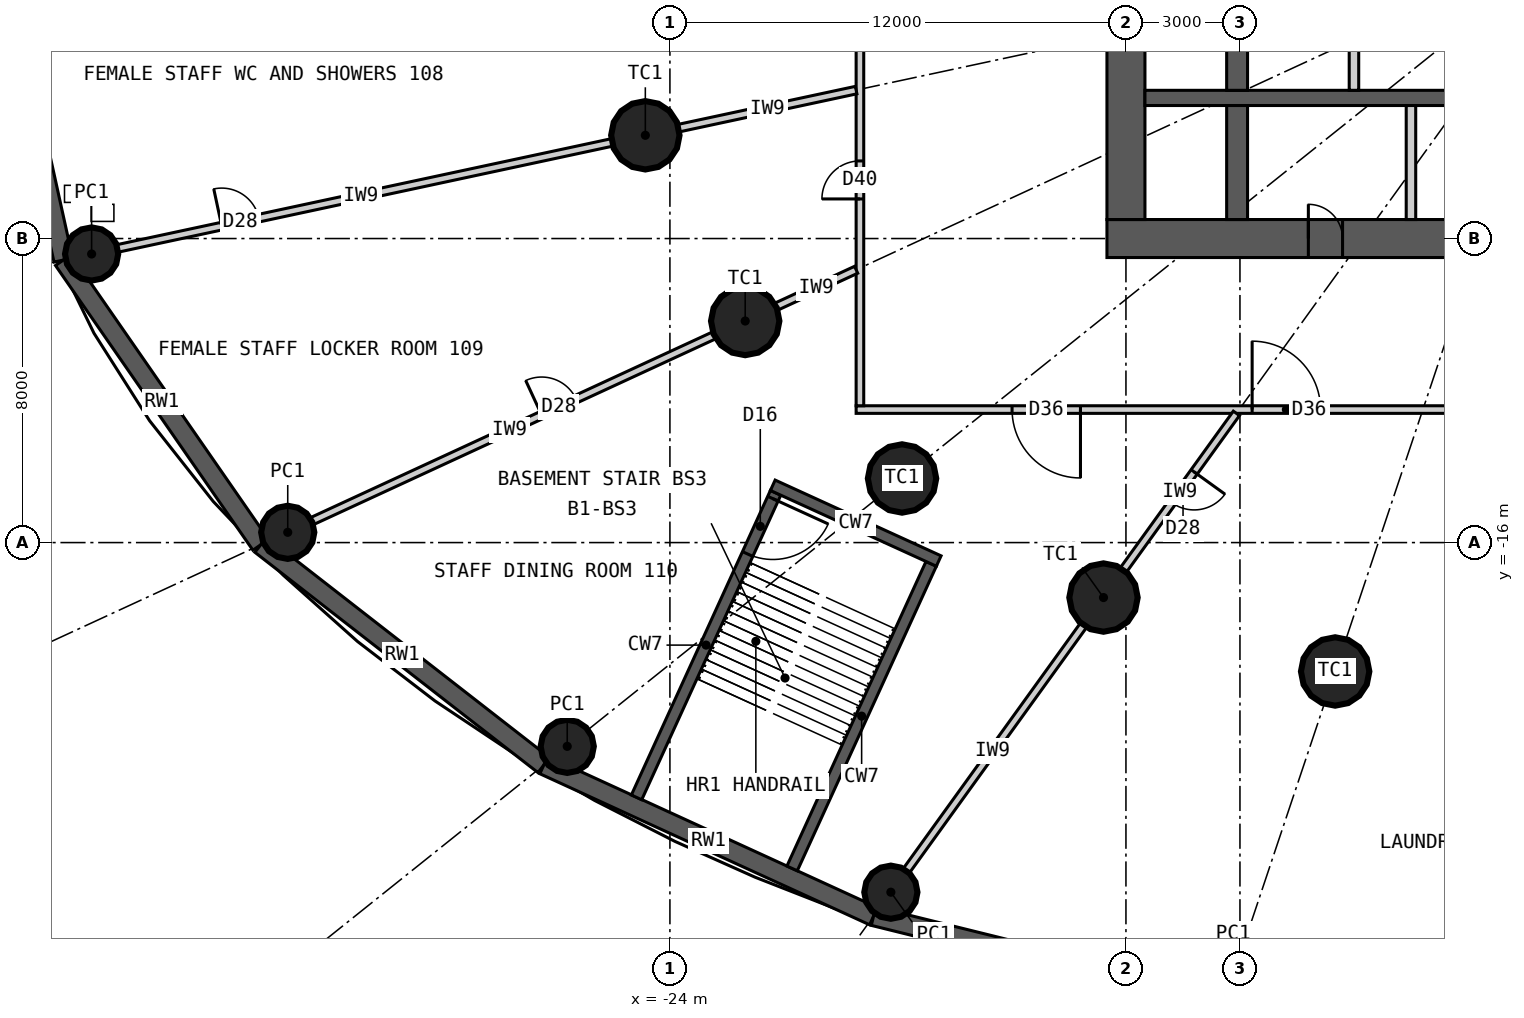
"""IFC4 building model, lengths in metres.
Left out: names, types, materials, properties, quantities, classifications, styles, units other than length and angle.
Written with IfcOpenShell. Run it as: python <this file> out.ifc"""

import sys

from ifc_helpers import new_model, si_unit, direction, frame, frame_2d, origin, origin_2d, place, context, subcontext, project, spatial, rectangle, circle, extrude, element, fill, save


model = new_model("IFC4")
c1 = context("Model", 3, precision=1e-05, world=origin(), true_north=direction((0.0, 1.0)))
c2 = subcontext(c1, "Body", "Model", "MODEL_VIEW")
j1 = project(units=[si_unit("LENGTHUNIT", "METRE"), si_unit("PLANEANGLEUNIT", "RADIAN")], contexts=[c1])
p1 = place(None, origin())
s1 = spatial("IfcSite", under=j1, at=p1, CompositionType="ELEMENT")
p2 = place(p1, origin())
s2 = spatial("IfcBuilding", under=s1, at=p2, CompositionType="ELEMENT")
p3 = place(p2, frame((0.0, 0.0, -6.0)))
s3 = spatial("IfcBuildingStorey", under=s2, at=p3, CompositionType="ELEMENT", Elevation=-6.0)
for number, where, z_axis, x_axis in (
    (1, (-24.647, -5.283, 0.0), (0.0, 0.0, 1.0), (1.0, 0.0, 0.0)),
    (2, (-22.019, -10.17, 0.0), (0.0, 0.0, 1.0), (1.0, 0.0, 0.0)),
    (3, (-17.892, -14.313, 0.0), (0.0, 0.0, 1.0), (1.0, 0.0, 0.0)),
    (4, (-12.591, -17.447, 0.0), (0.0, 0.0, 1.0), (1.0, 0.0, 0.0)),
    (5, (-6.495, -19.391, 0.0), (0.0, 0.0, 1.0), (1.0, 0.0, 0.0)),
):
    element("IfcColumn", number, at=place(p3, frame(where, z_axis=z_axis, x_axis=x_axis)), inside=s3, PredefinedType="COLUMN", context=c2, shape_type="SweptSolid", body=[
        extrude(circle(Radius=0.9, at=origin_2d()), origin(), (0.0, 0.0, 1.0), 6.0),
    ])
for number, where, z_axis, x_axis in (
    (6, (-39.218, -8.407, 0.0), (0.0, 0.0, 1.0), (1.0, 0.0, 0.0)),
    (7, (-34.057, -15.73, 0.0), (0.0, 0.0, 1.0), (1.0, 0.0, 0.0)),
    (8, (-26.702, -21.362, 0.0), (0.0, 0.0, 1.0), (1.0, 0.0, 0.0)),
    (9, (-18.186, -25.199, 0.0), (0.0, 0.0, 1.0), (1.0, 0.0, 0.0)),
):
    element("IfcColumn", number, at=place(p3, frame(where, z_axis=z_axis, x_axis=x_axis)), inside=s3, PredefinedType="COLUMN", context=c2, shape_type="SweptSolid", body=[
        extrude(circle(Radius=0.7, at=origin_2d()), origin(), (0.0, 0.0, 1.0), 6.0),
    ])
p4 = place(p3, frame((12.5, -8.0, 0.0), z_axis=(0.0, 0.0, 1.0), x_axis=(-1.0, 0.0, 0.0)))
e10 = element("IfcWall", 10, at=p4, inside=s3, PredefinedType="SHEAR", context=c2, shape_type="SweptSolid", body=[
    extrude(rectangle(XDim=25.0, YDim=1.0, at=frame_2d((12.5, 0.0))), origin(), (0.0, 0.0, 1.0), 6.0),
])
p5 = place(p4, frame((11.2, 0.0, 0.0)))
e11 = element("IfcOpeningElement", 11, at=p5, cuts=e10, PredefinedType="OPENING", context=c2, shape_type="SweptSolid", body=[
    extrude(rectangle(XDim=1.2, YDim=2.2, at=frame_2d((0.6, 1.1))), frame((0.0, 0.51, 0.0), z_axis=(0.0, -1.0, 0.0), x_axis=(1.0, 0.0, 0.0)), (0.0, 0.0, 1.0), 1.02),
])
p6 = place(p4, frame((18.8, 0.0, 0.0)))
e12 = element("IfcOpeningElement", 12, at=p6, cuts=e10, PredefinedType="OPENING", context=c2, shape_type="SweptSolid", body=[
    extrude(rectangle(XDim=0.9, YDim=2.2, at=frame_2d((0.45, 1.1))), frame((0.0, 0.51, 0.0), z_axis=(0.0, -1.0, 0.0), x_axis=(1.0, 0.0, 0.0)), (0.0, 0.0, 1.0), 1.02),
])
p7 = place(p3, frame((-12.0, 7.5, 0.0), z_axis=(0.0, 0.0, 1.0), x_axis=(0.0, -1.0, 0.0)))
e13 = element("IfcWall", 13, at=p7, inside=s3, PredefinedType="SHEAR", context=c2, shape_type="SweptSolid", body=[
    extrude(rectangle(XDim=15.0, YDim=1.0, at=frame_2d((7.5, 0.0))), origin(), (0.0, 0.0, 1.0), 6.0),
])
p8 = place(p7, frame((6.6, 0.0, 0.0)))
e14 = element("IfcOpeningElement", 14, at=p8, cuts=e13, PredefinedType="OPENING", context=c2, shape_type="SweptSolid", body=[
    extrude(rectangle(XDim=1.8, YDim=2.2, at=frame_2d((0.9, 1.1))), frame((0.0, 0.51, 0.0), z_axis=(0.0, -1.0, 0.0), x_axis=(1.0, 0.0, 0.0)), (0.0, 0.0, 1.0), 1.02),
])
p9 = place(p3, frame((-11.5, -4.3, 0.0), z_axis=(0.0, 0.0, 1.0), x_axis=(1.0, 0.0, 0.0)))
e15 = element("IfcWall", 15, at=p9, inside=s3, PredefinedType="SHEAR", context=c2, shape_type="SweptSolid", body=[
    extrude(rectangle(XDim=23.0, YDim=0.4, at=frame_2d((11.5, 0.0))), origin(), (0.0, 0.0, 1.0), 6.0),
])
p10 = place(p3, frame((-9.075, -4.1, 0.0), z_axis=(0.0, 0.0, 1.0), x_axis=(0.0, 1.0, 0.0)))
e16 = element("IfcWall", 16, at=p10, inside=s3, PredefinedType="SHEAR", context=c2, shape_type="SweptSolid", body=[
    extrude(rectangle(XDim=2.35, YDim=0.55, at=frame_2d((1.175, 0.0))), origin(), (0.0, 0.0, 1.0), 6.0),
])
p11 = place(p3, frame((-9.075, -7.5, 0.0), z_axis=(0.0, 0.0, 1.0), x_axis=(0.0, 1.0, 0.0)))
e17 = element("IfcWall", 17, at=p11, inside=s3, PredefinedType="SHEAR", context=c2, shape_type="SweptSolid", body=[
    extrude(rectangle(XDim=3.0, YDim=0.55, at=frame_2d((1.5, 0.0))), origin(), (0.0, 0.0, 1.0), 6.0),
])
p12 = place(p3, frame((-4.5, -7.5, 0.0), z_axis=(0.0, 0.0, 1.0), x_axis=(0.0, 1.0, 0.0)))
e18 = element("IfcWall", 18, at=p12, inside=s3, PredefinedType="PARTITIONING", context=c2, shape_type="SweptSolid", body=[
    extrude(rectangle(XDim=3.0, YDim=0.25, at=frame_2d((1.5, 0.0))), origin(), (0.0, 0.0, 1.0), 6.0),
])
p13 = place(p3, frame((-6.0, -4.1, 0.0), z_axis=(0.0, 0.0, 1.0), x_axis=(0.0, 1.0, 0.0)))
e19 = element("IfcWall", 19, at=p13, inside=s3, PredefinedType="PARTITIONING", context=c2, shape_type="SweptSolid", body=[
    extrude(rectangle(XDim=2.35, YDim=0.25, at=frame_2d((1.175, 0.0))), origin(), (0.0, 0.0, 1.0), 6.0),
])
p14 = place(p3, frame((-41.85, 0.0, 0.0), z_axis=(0.0, 0.0, 1.0), x_axis=(0.215170782675, -0.976576435454, 0.0)))
e20 = element("IfcWall", 20, at=p14, inside=s3, PredefinedType="SOLIDWALL", context=c2, shape_type="SweptSolid", body=[
    extrude(rectangle(XDim=8.772, YDim=0.5, at=frame_2d((4.386, 0.0))), origin(), (0.0, 0.0, 1.0), 5.75),
])
p15 = place(p3, frame((-39.963, -8.566, 0.0), z_axis=(0.0, 0.0, 1.0), x_axis=(0.569815549616, -0.821772620264, 0.0)))
e21 = element("IfcWall", 21, at=p15, inside=s3, PredefinedType="SOLIDWALL", context=c2, shape_type="SweptSolid", body=[
    extrude(rectangle(XDim=9.117, YDim=0.5, at=frame_2d((4.559, 0.0))), origin(), (0.0, 0.0, 1.0), 5.75),
])
p16 = place(p3, frame((-34.768, -16.059, 0.0), z_axis=(0.0, 0.0, 1.0), x_axis=(0.789189230142, -0.614150111152, 0.0)))
e22 = element("IfcWall", 22, at=p16, inside=s3, PredefinedType="SOLIDWALL", context=c2, shape_type="SweptSolid", body=[
    extrude(rectangle(XDim=9.438, YDim=0.5, at=frame_2d((4.719, 0.0))), origin(), (0.0, 0.0, 1.0), 5.75),
])
p17 = place(p3, frame((-27.319, -21.855, 0.0), z_axis=(0.0, 0.0, 1.0), x_axis=(0.909171365198, -0.416422176047, 0.0)))
e23 = element("IfcWall", 23, at=p17, inside=s3, PredefinedType="SOLIDWALL", context=c2, shape_type="SweptSolid", body=[
    extrude(rectangle(XDim=9.545, YDim=0.5, at=frame_2d((4.772, 0.0))), origin(), (0.0, 0.0, 1.0), 5.75),
])
p18 = place(p3, frame((-18.641, -25.83, 0.0), z_axis=(0.0, 0.0, 1.0), x_axis=(0.97078133687, -0.239965822533, 0.0)))
e24 = element("IfcWall", 24, at=p18, inside=s3, PredefinedType="SOLIDWALL", context=c2, shape_type="SweptSolid", body=[
    extrude(rectangle(XDim=9.503, YDim=0.5, at=frame_2d((4.752, 0.0))), origin(), (0.0, 0.0, 1.0), 5.75),
])
p19 = place(p3, frame((19.1, -12.5, 0.0), z_axis=(0.0, 0.0, 1.0), x_axis=(-1.0, 0.0, 0.0)))
e25 = element("IfcWall", 25, at=p19, inside=s3, PredefinedType="PARTITIONING", context=c2, shape_type="SweptSolid", body=[
    extrude(rectangle(XDim=38.2, YDim=0.2, at=frame_2d((19.1, 0.0))), origin(), (0.0, 0.0, 1.0), 5.75),
])
p20 = place(p19, frame((32.297, 0.0, 0.0)))
e26 = element("IfcOpeningElement", 26, at=p20, cuts=e25, PredefinedType="OPENING", context=c2, shape_type="SweptSolid", body=[
    extrude(rectangle(XDim=1.8, YDim=2.4, at=frame_2d((0.9, 1.2))), frame((0.0, 0.11, 0.0), z_axis=(0.0, -1.0, 0.0), x_axis=(1.0, 0.0, 0.0)), (0.0, 0.0, 1.0), 0.22),
])
p21 = place(p19, frame((19.079, 0.0, 0.0)))
e27 = element("IfcOpeningElement", 27, at=p21, cuts=e25, PredefinedType="OPENING", context=c2, shape_type="SweptSolid", body=[
    extrude(rectangle(XDim=1.8, YDim=2.4, at=frame_2d((0.9, 1.2))), frame((0.0, 0.11, 0.0), z_axis=(0.0, -1.0, 0.0), x_axis=(1.0, 0.0, 0.0)), (0.0, 0.0, 1.0), 0.22),
])
p22 = place(p19, frame((11.843, 0.0, 0.0)))
e28 = element("IfcOpeningElement", 28, at=p22, cuts=e25, PredefinedType="OPENING", context=c2, shape_type="SweptSolid", body=[
    extrude(rectangle(XDim=1.2, YDim=2.2, at=frame_2d((0.6, 1.1))), frame((0.0, 0.11, 0.0), z_axis=(0.0, -1.0, 0.0), x_axis=(1.0, 0.0, 0.0)), (0.0, 0.0, 1.0), 0.22),
])
p23 = place(p19, frame((6.178, 0.0, 0.0)))
e29 = element("IfcOpeningElement", 29, at=p23, cuts=e25, PredefinedType="OPENING", context=c2, shape_type="SweptSolid", body=[
    extrude(rectangle(XDim=1.0, YDim=2.2, at=frame_2d((0.5, 1.1))), frame((0.0, 0.11, 0.0), z_axis=(0.0, -1.0, 0.0), x_axis=(1.0, 0.0, 0.0)), (0.0, 0.0, 1.0), 0.22),
])
p24 = place(p19, frame((25.979, 0.0, 0.0)))
e30 = element("IfcOpeningElement", 30, at=p24, cuts=e25, PredefinedType="OPENING", context=c2, shape_type="SweptSolid", body=[
    extrude(rectangle(XDim=1.8, YDim=2.4, at=frame_2d((0.9, 1.2))), frame((0.0, 0.11, 0.0), z_axis=(0.0, -1.0, 0.0), x_axis=(1.0, 0.0, 0.0)), (0.0, 0.0, 1.0), 0.22),
])
p25 = place(p3, frame((-19.0, 12.4, 0.0), z_axis=(0.0, 0.0, 1.0), x_axis=(0.0, -1.0, 0.0)))
e31 = element("IfcWall", 31, at=p25, inside=s3, PredefinedType="PARTITIONING", context=c2, shape_type="SweptSolid", body=[
    extrude(rectangle(XDim=24.8, YDim=0.2, at=frame_2d((12.4, 0.0))), origin(), (0.0, 0.0, 1.0), 5.75),
])
p26 = place(p25, frame((5.442, 0.0, 0.0)))
e32 = element("IfcOpeningElement", 32, at=p26, cuts=e31, PredefinedType="OPENING", context=c2, shape_type="SweptSolid", body=[
    extrude(rectangle(XDim=1.0, YDim=2.2, at=frame_2d((0.5, 1.1))), frame((0.0, 0.11, 0.0), z_axis=(0.0, -1.0, 0.0), x_axis=(1.0, 0.0, 0.0)), (0.0, 0.0, 1.0), 0.22),
])
p27 = place(p25, frame((9.853, 0.0, 0.0)))
e33 = element("IfcOpeningElement", 33, at=p27, cuts=e31, PredefinedType="OPENING", context=c2, shape_type="SweptSolid", body=[
    extrude(rectangle(XDim=1.0, YDim=2.1, at=frame_2d((0.5, 1.05))), frame((0.0, 0.11, 0.0), z_axis=(0.0, -1.0, 0.0), x_axis=(1.0, 0.0, 0.0)), (0.0, 0.0, 1.0), 0.22),
])
p28 = place(p25, frame((13.947, 0.0, 0.0)))
e34 = element("IfcOpeningElement", 34, at=p28, cuts=e31, PredefinedType="OPENING", context=c2, shape_type="SweptSolid", body=[
    extrude(rectangle(XDim=1.0, YDim=2.1, at=frame_2d((0.5, 1.05))), frame((0.0, 0.11, 0.0), z_axis=(0.0, -1.0, 0.0), x_axis=(1.0, 0.0, 0.0)), (0.0, 0.0, 1.0), 0.22),
])
p29 = place(p25, frame((18.358, 0.0, 0.0)))
e35 = element("IfcOpeningElement", 35, at=p29, cuts=e31, PredefinedType="OPENING", context=c2, shape_type="SweptSolid", body=[
    extrude(rectangle(XDim=1.0, YDim=2.2, at=frame_2d((0.5, 1.1))), frame((0.0, 0.11, 0.0), z_axis=(0.0, -1.0, 0.0), x_axis=(1.0, 0.0, 0.0)), (0.0, 0.0, 1.0), 0.22),
])
p30 = place(p3, frame((-19.1, -4.094, 0.0), z_axis=(0.0, 0.0, 1.0), x_axis=(-0.977784445586, -0.209612924148, 0.0)))
e36 = element("IfcWall", 36, at=p30, inside=s3, PredefinedType="PARTITIONING", context=c2, shape_type="SweptSolid", body=[
    extrude(rectangle(XDim=4.773, YDim=0.2, at=frame_2d((2.386, 0.0))), origin(), (0.0, 0.0, 1.0), 4.9),
])
p31 = place(p3, frame((-25.527, -5.472, 0.0), z_axis=(0.0, 0.0, 1.0), x_axis=(-0.97778865169, -0.209593302913, 0.0)))
e37 = element("IfcWall", 37, at=p31, inside=s3, PredefinedType="PARTITIONING", context=c2, shape_type="SweptSolid", body=[
    extrude(rectangle(XDim=13.501, YDim=0.2, at=frame_2d((6.751, 0.0))), origin(), (0.0, 0.0, 1.0), 4.85),
])
p32 = place(p31, frame((9.5, 0.0, 0.0)))
e38 = element("IfcOpeningElement", 38, at=p32, cuts=e37, PredefinedType="OPENING", context=c2, shape_type="SweptSolid", body=[
    extrude(rectangle(XDim=1.0, YDim=2.2, at=frame_2d((0.5, 1.1))), frame((0.0, 0.11, 0.0), z_axis=(0.0, -1.0, 0.0), x_axis=(1.0, 0.0, 0.0)), (0.0, 0.0, 1.0), 0.22),
])
p33 = place(p3, frame((-19.1, -8.822, 0.0), z_axis=(0.0, 0.0, 1.0), x_axis=(-0.907872952542, -0.419245395971, 0.0)))
e39 = element("IfcWall", 39, at=p33, inside=s3, PredefinedType="PARTITIONING", context=c2, shape_type="SweptSolid", body=[
    extrude(rectangle(XDim=2.315, YDim=0.2, at=frame_2d((1.158, 0.0))), origin(), (0.0, 0.0, 1.0), 4.85),
])
p34 = place(p3, frame((-22.836, -10.548, 0.0), z_axis=(0.0, 0.0, 1.0), x_axis=(-0.90784065247, -0.419315334471, 0.0)))
e40 = element("IfcWall", 40, at=p34, inside=s3, PredefinedType="PARTITIONING", context=c2, shape_type="SweptSolid", body=[
    extrude(rectangle(XDim=11.86, YDim=0.2, at=frame_2d((5.93, 0.0))), origin(), (0.0, 0.0, 1.0), 4.85),
])
p35 = place(p34, frame((4.0, 0.0, 0.0)))
e41 = element("IfcOpeningElement", 41, at=p35, cuts=e40, PredefinedType="OPENING", context=c2, shape_type="SweptSolid", body=[
    extrude(rectangle(XDim=1.0, YDim=2.2, at=frame_2d((0.5, 1.1))), frame((0.0, 0.11, 0.0), z_axis=(0.0, -1.0, 0.0), x_axis=(1.0, 0.0, 0.0)), (0.0, 0.0, 1.0), 0.22),
])
p36 = place(p3, frame((-9.093, -12.6, 0.0), z_axis=(0.0, 0.0, 1.0), x_axis=(-0.58522538525, -0.810870673079, 0.0)))
e42 = element("IfcWall", 42, at=p36, inside=s3, PredefinedType="PARTITIONING", context=c2, shape_type="SweptSolid", body=[
    extrude(rectangle(XDim=5.077, YDim=0.2, at=frame_2d((2.538, 0.0))), origin(), (0.0, 0.0, 1.0), 4.9),
])
p37 = place(p36, frame((1.9, 0.0, 0.0)))
e43 = element("IfcOpeningElement", 43, at=p37, cuts=e42, PredefinedType="OPENING", context=c2, shape_type="SweptSolid", body=[
    extrude(rectangle(XDim=1.0, YDim=2.2, at=frame_2d((0.5, 1.1))), frame((0.0, 0.11, 0.0), z_axis=(0.0, -1.0, 0.0), x_axis=(1.0, 0.0, 0.0)), (0.0, 0.0, 1.0), 0.22),
])
p38 = place(p3, frame((-13.118, -18.176, 0.0), z_axis=(0.0, 0.0, 1.0), x_axis=(-0.585204349301, -0.810885854828, 0.0)))
e44 = element("IfcWall", 44, at=p38, inside=s3, PredefinedType="PARTITIONING", context=c2, shape_type="SweptSolid", body=[
    extrude(rectangle(XDim=8.161, YDim=0.2, at=frame_2d((4.081, 0.0))), origin(), (0.0, 0.0, 1.0), 4.85),
])
p39 = place(p3, frame((-21.219, -14.691, 0.0), z_axis=(0.0, 0.0, 1.0), x_axis=(-0.41534319891, -0.909664788325, 0.0)))
e45 = element("IfcWall", 45, at=p39, inside=s3, PredefinedType="SHEAR", context=c2, shape_type="SweptSolid", body=[
    extrude(rectangle(XDim=8.81, YDim=0.3, at=frame_2d((4.405, 0.0))), origin(), (0.0, 0.0, 1.0), 5.75),
])
p40 = place(p39, frame((0.17, 0.0, 0.0)))
e46 = element("IfcOpeningElement", 46, at=p40, cuts=e45, PredefinedType="OPENING", context=c2, shape_type="SweptSolid", body=[
    extrude(rectangle(XDim=1.6, YDim=2.1, at=frame_2d((0.8, 1.05))), frame((0.0, 0.16, 0.0), z_axis=(0.0, -1.0, 0.0), x_axis=(1.0, 0.0, 0.0)), (0.0, 0.0, 1.0), 0.32),
])
p41 = place(p3, frame((-20.785, -24.574, 0.0), z_axis=(0.0, 0.0, 1.0), x_axis=(0.41534319891, 0.909664788325, 0.0)))
e47 = element("IfcWall", 47, at=p41, inside=s3, PredefinedType="SHEAR", context=c2, shape_type="SweptSolid", body=[
    extrude(rectangle(XDim=8.81, YDim=0.3, at=frame_2d((4.405, 0.0))), origin(), (0.0, 0.0, 1.0), 5.75),
])
p42 = place(p3, frame((-16.927, -16.485, 0.0), z_axis=(0.0, 0.0, 1.0), x_axis=(-0.90966669911, 0.415339013975, 0.0)))
e48 = element("IfcWall", 48, at=p42, inside=s3, PredefinedType="SHEAR", context=c2, shape_type="SweptSolid", body=[
    extrude(rectangle(XDim=4.8, YDim=0.3, at=frame_2d((2.4, 0.0))), origin(), (0.0, 0.0, 1.0), 5.75),
])
p43 = place(p40, origin())
e49 = element("IfcDoor", 49, at=p43, inside=s3, OperationType="SINGLE_SWING_LEFT", PredefinedType="DOOR", context=c2, shape_type="SweptSolid", body=[
    extrude(rectangle(XDim=1.6, YDim=2.1, at=frame_2d((0.8, 1.05))), frame((0.0, 0.025, 0.0), z_axis=(0.0, -1.0, 0.0), x_axis=(1.0, 0.0, 0.0)), (0.0, 0.0, 1.0), 0.05),
])
fill(e46, e49)
p44 = place(p29, origin())
e50 = element("IfcDoor", 50, at=p44, inside=s3, OperationType="SINGLE_SWING_RIGHT", PredefinedType="DOOR", context=c2, shape_type="SweptSolid", body=[
    extrude(rectangle(XDim=1.0, YDim=2.2, at=frame_2d((0.5, 1.1))), frame((0.0, 0.025, 0.0), z_axis=(0.0, -1.0, 0.0), x_axis=(1.0, 0.0, 0.0)), (0.0, 0.0, 1.0), 0.05),
])
fill(e35, e50)
p45 = place(p20, origin())
e51 = element("IfcDoor", 51, at=p45, inside=s3, OperationType="DOUBLE_DOOR_DOUBLE_SWING", PredefinedType="DOOR", context=c2, shape_type="SweptSolid", body=[
    extrude(rectangle(XDim=1.8, YDim=2.4, at=frame_2d((0.9, 1.2))), frame((0.0, 0.025, 0.0), z_axis=(0.0, -1.0, 0.0), x_axis=(1.0, 0.0, 0.0)), (0.0, 0.0, 1.0), 0.05),
])
fill(e26, e51)
p46 = place(p6, origin())
e52 = element("IfcDoor", 52, at=p46, inside=s3, OperationType="SINGLE_SWING_RIGHT", PredefinedType="DOOR", context=c2, shape_type="SweptSolid", body=[
    extrude(rectangle(XDim=0.9, YDim=2.2, at=frame_2d((0.45, 1.1))), frame((0.0, 0.025, 0.0), z_axis=(0.0, -1.0, 0.0), x_axis=(1.0, 0.0, 0.0)), (0.0, 0.0, 1.0), 0.05),
])
fill(e12, e52)
p47 = place(p24, origin())
e53 = element("IfcDoor", 53, at=p47, inside=s3, OperationType="DOUBLE_DOOR_DOUBLE_SWING", PredefinedType="DOOR", context=c2, shape_type="SweptSolid", body=[
    extrude(rectangle(XDim=1.8, YDim=2.4, at=frame_2d((0.9, 1.2))), frame((0.0, 0.025, 0.0), z_axis=(0.0, -1.0, 0.0), x_axis=(1.0, 0.0, 0.0)), (0.0, 0.0, 1.0), 0.05),
])
fill(e30, e53)
p48 = place(p32, origin())
e54 = element("IfcDoor", 54, at=p48, inside=s3, OperationType="SINGLE_SWING_RIGHT", PredefinedType="DOOR", context=c2, shape_type="SweptSolid", body=[
    extrude(rectangle(XDim=1.0, YDim=2.2, at=frame_2d((0.5, 1.1))), frame((0.0, 0.025, 0.0), z_axis=(0.0, -1.0, 0.0), x_axis=(1.0, 0.0, 0.0)), (0.0, 0.0, 1.0), 0.05),
])
fill(e38, e54)
p49 = place(p35, origin())
e55 = element("IfcDoor", 55, at=p49, inside=s3, OperationType="SINGLE_SWING_RIGHT", PredefinedType="DOOR", context=c2, shape_type="SweptSolid", body=[
    extrude(rectangle(XDim=1.0, YDim=2.2, at=frame_2d((0.5, 1.1))), frame((0.0, 0.025, 0.0), z_axis=(0.0, -1.0, 0.0), x_axis=(1.0, 0.0, 0.0)), (0.0, 0.0, 1.0), 0.05),
])
fill(e41, e55)
p50 = place(p37, origin())
e56 = element("IfcDoor", 56, at=p50, inside=s3, OperationType="SINGLE_SWING_LEFT", PredefinedType="DOOR", context=c2, shape_type="SweptSolid", body=[
    extrude(rectangle(XDim=1.0, YDim=2.2, at=frame_2d((0.5, 1.1))), frame((0.0, 0.025, 0.0), z_axis=(0.0, -1.0, 0.0), x_axis=(1.0, 0.0, 0.0)), (0.0, 0.0, 1.0), 0.05),
])
fill(e43, e56)
save(model, sys.argv[1])
